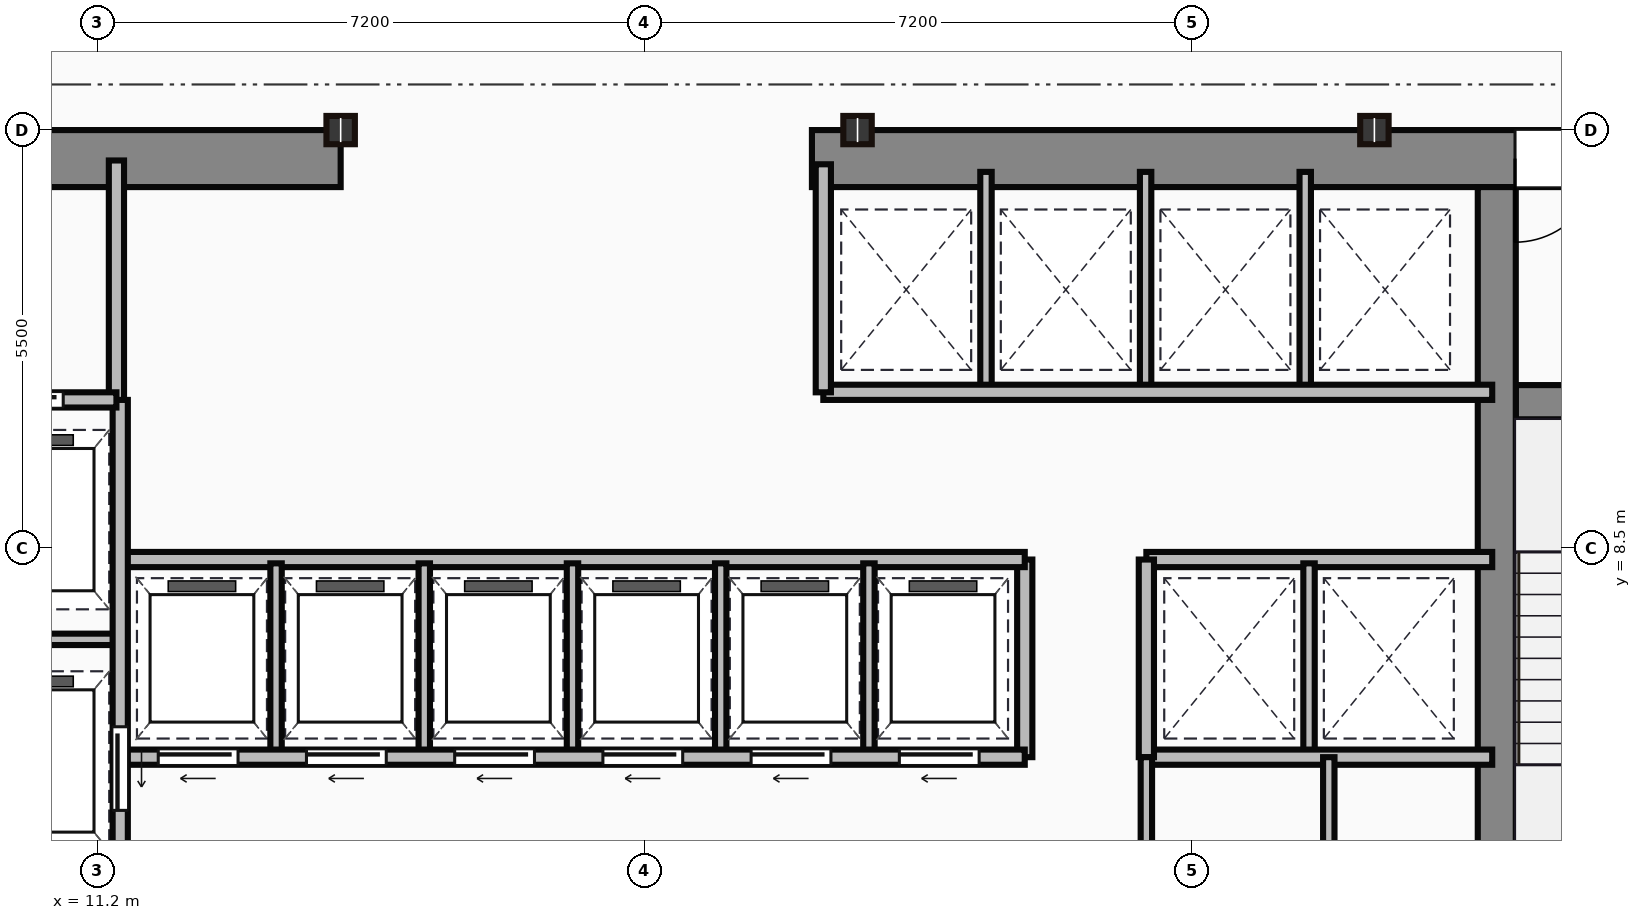
"""IFC4 building model, lengths in metres.
Left out: names, types, materials, properties, quantities, classifications, styles, units other than length and angle.
Written with IfcOpenShell. Run it as: python <this file> out.ifc"""

import sys

from ifc_helpers import new_model, si_unit, direction, frame, frame_2d, origin, origin_2d, place, context, subcontext, project, spatial, rectangle, i_section, extrude, source, transform, mapped, element, fill, save


model = new_model("IFC4")
c1 = context("Model", 3, precision=1e-05, world=origin(), true_north=direction((0.0, 1.0)))
c2 = subcontext(c1, "Body", "Model", "MODEL_VIEW")
j1 = project(units=[si_unit("LENGTHUNIT", "METRE"), si_unit("PLANEANGLEUNIT", "RADIAN")], contexts=[c1])
p1 = place(None, origin())
s1 = spatial("IfcSite", under=j1, at=p1, CompositionType="ELEMENT")
p2 = place(p1, origin())
s2 = spatial("IfcBuilding", under=s1, at=p2, CompositionType="ELEMENT")
p3 = place(p2, frame((0.0, 0.0, 177.1)))
s3 = spatial("IfcBuildingStorey", under=s2, at=p3, CompositionType="ELEMENT", Elevation=177.1)
m1 = source(origin(), c2, "Body", "SweptSolid", [
    extrude(rectangle(XDim=9.1, YDim=0.75, at=frame_2d((4.55, 0.0))), origin(), (0.0, 0.0, 1.0), 3.65),
])
p4 = place(p3, frame((5.3, 13.625, 0.0), z_axis=(0.0, 0.0, 1.0), x_axis=(1.0, 0.0, 0.0)))
e1 = element("IfcWall", 1, at=p4, inside=s3, PredefinedType="SHEAR", context=c2, shape_type="MappedRepresentation", body=[
    mapped(m1, transform((0.0, 0.0, 0.0))),
])
p5 = place(p4, frame((4.1, 0.0, 0.0)))
e2 = element("IfcOpeningElement", 2, at=p5, cuts=e1, PredefinedType="OPENING", context=c2, shape_type="SweptSolid", body=[
    extrude(rectangle(XDim=1.1, YDim=2.15, at=frame_2d((0.55, 1.075))), frame((0.0, 0.385, 0.0), z_axis=(0.0, -1.0, 0.0), x_axis=(1.0, 0.0, 0.0)), (0.0, 0.0, 1.0), 0.77),
])
m2 = source(origin(), c2, "Body", "SweptSolid", [
    extrude(rectangle(XDim=12.6, YDim=0.75, at=frame_2d((6.3, 0.0))), origin(), (0.0, 0.0, 1.0), 3.65),
])
p6 = place(p3, frame((20.6, 13.625, 0.0), z_axis=(0.0, 0.0, 1.0), x_axis=(1.0, 0.0, 0.0)))
e3 = element("IfcWall", 3, at=p6, inside=s3, PredefinedType="SHEAR", context=c2, shape_type="MappedRepresentation", body=[
    mapped(m2, transform((0.0, 0.0, 0.0))),
])
p7 = place(p6, frame((9.25, 0.0, 0.0)))
e4 = element("IfcOpeningElement", 4, at=p7, cuts=e3, PredefinedType="OPENING", context=c2, shape_type="SweptSolid", body=[
    extrude(rectangle(XDim=1.1, YDim=2.15, at=frame_2d((0.55, 1.075))), frame((0.0, 0.385, 0.0), z_axis=(0.0, -1.0, 0.0), x_axis=(1.0, 0.0, 0.0)), (0.0, 0.0, 1.0), 0.77),
])
m3 = source(origin(), c2, "Body", "SweptSolid", [
    extrude(rectangle(XDim=12.35, YDim=0.5, at=frame_2d((6.175, 0.0))), origin(), (0.0, 0.0, 1.0), 3.65),
])
p8 = place(p3, frame((29.61, 0.9, 0.0), z_axis=(0.0, 0.0, 1.0), x_axis=(0.0, 1.0, 0.0)))
e5 = element("IfcWall", 5, at=p8, inside=s3, PredefinedType="SHEAR", context=c2, shape_type="MappedRepresentation", body=[
    mapped(m3, transform((0.0, 0.0, 0.0))),
])
m4 = source(origin(), c2, "Body", "SweptSolid", [
    extrude(rectangle(XDim=3.39, YDim=0.45, at=frame_2d((1.695, 0.0))), origin(), (0.0, 0.0, 1.0), 3.65),
])
p9 = place(p3, frame((29.86, 10.42, 0.0), z_axis=(0.0, 0.0, 1.0), x_axis=(1.0, 0.0, 0.0)))
e6 = element("IfcWall", 6, at=p9, inside=s3, PredefinedType="SHEAR", context=c2, shape_type="MappedRepresentation", body=[
    mapped(m4, transform((0.0, 0.0, 0.0))),
])
p10 = place(p9, frame((1.1, 0.0, 0.0)))
e7 = element("IfcOpeningElement", 7, at=p10, cuts=e6, PredefinedType="OPENING", context=c2, shape_type="SweptSolid", body=[
    extrude(rectangle(XDim=1.1, YDim=2.15, at=frame_2d((0.55, 1.075))), frame((0.0, 0.235, 0.0), z_axis=(0.0, -1.0, 0.0), x_axis=(1.0, 0.0, 0.0)), (0.0, 0.0, 1.0), 0.47),
])
m5 = source(origin(), c2, "Body", "SweptSolid", [
    extrude(i_section(OverallWidth=0.374, OverallDepth=0.372, WebThickness=0.016, FlangeThickness=0.026, at=origin_2d()), origin(), (0.0, 0.0, 1.0), 3.65),
])
for number, where, z_axis, x_axis in (
    (8, (14.4, 14.0, 0.0), (0.0, 0.0, 1.0), (1.0, 0.0, 0.0)),
    (9, (21.2, 14.0, 0.0), (0.0, 0.0, 1.0), (1.0, 0.0, 0.0)),
    (10, (28.0, 14.0, 0.0), (0.0, 0.0, 1.0), (1.0, 0.0, 0.0)),
):
    element("IfcColumn", number, at=place(p3, frame(where, z_axis=z_axis, x_axis=x_axis)), inside=s3, PredefinedType="COLUMN", context=c2, shape_type="MappedRepresentation", body=[
        mapped(m5, transform((0.0, 0.0, 0.0))),
    ])
m6 = source(origin(), c2, "Body", "SweptSolid", [
    extrude(rectangle(XDim=3.18, YDim=0.2, at=frame_2d((1.59, 0.0))), origin(), (0.0, 0.0, 1.0), 3.4),
])
p11 = place(p3, frame((11.45, 10.42, 0.0), z_axis=(0.0, 0.0, 1.0), x_axis=(0.0, 1.0, 0.0)))
e11 = element("IfcWall", 11, at=p11, inside=s3, PredefinedType="PARTITIONING", context=c2, shape_type="MappedRepresentation", body=[
    mapped(m6, transform((0.0, 0.0, 0.0))),
])
m7 = source(origin(), c2, "Body", "SweptSolid", [
    extrude(rectangle(XDim=2.35, YDim=0.2, at=frame_2d((1.175, 0.0))), origin(), (0.0, 0.0, 1.0), 3.4),
])
p12 = place(p3, frame((9.1, 10.45, 0.0), z_axis=(0.0, 0.0, 1.0), x_axis=(1.0, 0.0, 0.0)))
e12 = element("IfcWall", 12, at=p12, inside=s3, PredefinedType="PARTITIONING", context=c2, shape_type="MappedRepresentation", body=[
    mapped(m7, transform((0.0, 0.0, 0.0))),
])
p13 = place(p12, frame((0.55, 0.0, 0.0)))
e13 = element("IfcOpeningElement", 13, at=p13, cuts=e12, PredefinedType="OPENING", context=c2, shape_type="SweptSolid", body=[
    extrude(rectangle(XDim=1.1, YDim=2.15, at=frame_2d((0.55, 1.075))), frame((0.0, 0.11, 0.0), z_axis=(0.0, -1.0, 0.0), x_axis=(1.0, 0.0, 0.0)), (0.0, 0.0, 1.0), 0.22),
])
m8 = source(origin(), c2, "Body", "SweptSolid", [
    extrude(rectangle(XDim=9.6, YDim=0.2, at=frame_2d((4.8, 0.0))), origin(), (0.0, 0.0, 1.0), 3.4),
])
p14 = place(p3, frame((11.5, 0.85, 0.0), z_axis=(0.0, 0.0, 1.0), x_axis=(0.0, 1.0, 0.0)))
e14 = element("IfcWall", 14, at=p14, inside=s3, PredefinedType="PARTITIONING", context=c2, shape_type="MappedRepresentation", body=[
    mapped(m8, transform((0.0, 0.0, 0.0))),
])
p15 = place(p14, frame((4.2, 0.0, 0.0)))
e15 = element("IfcOpeningElement", 15, at=p15, cuts=e14, PredefinedType="OPENING", context=c2, shape_type="SweptSolid", body=[
    extrude(rectangle(XDim=1.1, YDim=2.15, at=frame_2d((0.55, 1.075))), frame((0.0, 0.11, 0.0), z_axis=(0.0, -1.0, 0.0), x_axis=(1.0, 0.0, 0.0)), (0.0, 0.0, 1.0), 0.22),
])
p16 = place(p14, frame((0.9, 0.0, 0.0)))
e16 = element("IfcOpeningElement", 16, at=p16, cuts=e14, PredefinedType="OPENING", context=c2, shape_type="SweptSolid", body=[
    extrude(rectangle(XDim=1.2, YDim=2.15, at=frame_2d((0.6, 1.075))), frame((0.0, 0.11, 0.0), z_axis=(0.0, -1.0, 0.0), x_axis=(1.0, 0.0, 0.0)), (0.0, 0.0, 1.0), 0.22),
])
m9 = source(origin(), c2, "Body", "SweptSolid", [
    extrude(rectangle(XDim=2.4, YDim=0.15, at=frame_2d((1.2, 0.0))), origin(), (0.0, 0.0, 1.0), 3.4),
])
p17 = place(p3, frame((9.1, 7.3, 0.0), z_axis=(0.0, 0.0, 1.0), x_axis=(1.0, 0.0, 0.0)))
e17 = element("IfcWall", 17, at=p17, inside=s3, PredefinedType="PARTITIONING", context=c2, shape_type="MappedRepresentation", body=[
    mapped(m9, transform((0.0, 0.0, 0.0))),
])
m10 = source(origin(), c2, "Body", "SweptSolid", [
    extrude(rectangle(XDim=11.85, YDim=0.2, at=frame_2d((5.925, 0.0))), origin(), (0.0, 0.0, 1.0), 3.4),
])
p18 = place(p3, frame((11.55, 5.75, 0.0), z_axis=(0.0, 0.0, 1.0), x_axis=(1.0, 0.0, 0.0)))
e18 = element("IfcWall", 18, at=p18, inside=s3, PredefinedType="PARTITIONING", context=c2, shape_type="MappedRepresentation", body=[
    mapped(m10, transform((0.0, 0.0, 0.0))),
])
p19 = place(p18, frame((0.45, 0.0, 0.0)))
e19 = element("IfcOpeningElement", 19, at=p19, cuts=e18, PredefinedType="OPENING", context=c2, shape_type="SweptSolid", body=[
    extrude(rectangle(XDim=1.05, YDim=2.15, at=frame_2d((0.525, 1.075))), frame((0.0, 0.11, 0.0), z_axis=(0.0, -1.0, 0.0), x_axis=(1.0, 0.0, 0.0)), (0.0, 0.0, 1.0), 0.22),
])
p20 = place(p18, frame((2.4, 0.0, 0.0)))
e20 = element("IfcOpeningElement", 20, at=p20, cuts=e18, PredefinedType="OPENING", context=c2, shape_type="SweptSolid", body=[
    extrude(rectangle(XDim=1.05, YDim=2.15, at=frame_2d((0.525, 1.075))), frame((0.0, 0.11, 0.0), z_axis=(0.0, -1.0, 0.0), x_axis=(1.0, 0.0, 0.0)), (0.0, 0.0, 1.0), 0.22),
])
p21 = place(p18, frame((4.35, 0.0, 0.0)))
e21 = element("IfcOpeningElement", 21, at=p21, cuts=e18, PredefinedType="OPENING", context=c2, shape_type="SweptSolid", body=[
    extrude(rectangle(XDim=1.05, YDim=2.15, at=frame_2d((0.525, 1.075))), frame((0.0, 0.11, 0.0), z_axis=(0.0, -1.0, 0.0), x_axis=(1.0, 0.0, 0.0)), (0.0, 0.0, 1.0), 0.22),
])
p22 = place(p18, frame((6.3, 0.0, 0.0)))
e22 = element("IfcOpeningElement", 22, at=p22, cuts=e18, PredefinedType="OPENING", context=c2, shape_type="SweptSolid", body=[
    extrude(rectangle(XDim=1.05, YDim=2.15, at=frame_2d((0.525, 1.075))), frame((0.0, 0.11, 0.0), z_axis=(0.0, -1.0, 0.0), x_axis=(1.0, 0.0, 0.0)), (0.0, 0.0, 1.0), 0.22),
])
p23 = place(p18, frame((8.25, 0.0, 0.0)))
e23 = element("IfcOpeningElement", 23, at=p23, cuts=e18, PredefinedType="OPENING", context=c2, shape_type="SweptSolid", body=[
    extrude(rectangle(XDim=1.05, YDim=2.15, at=frame_2d((0.525, 1.075))), frame((0.0, 0.11, 0.0), z_axis=(0.0, -1.0, 0.0), x_axis=(1.0, 0.0, 0.0)), (0.0, 0.0, 1.0), 0.22),
])
p24 = place(p18, frame((10.2, 0.0, 0.0)))
e24 = element("IfcOpeningElement", 24, at=p24, cuts=e18, PredefinedType="OPENING", context=c2, shape_type="SweptSolid", body=[
    extrude(rectangle(XDim=1.05, YDim=2.15, at=frame_2d((0.525, 1.075))), frame((0.0, 0.11, 0.0), z_axis=(0.0, -1.0, 0.0), x_axis=(1.0, 0.0, 0.0)), (0.0, 0.0, 1.0), 0.22),
])
p25 = place(p3, frame((11.55, 8.35, 0.0), z_axis=(0.0, 0.0, 1.0), x_axis=(1.0, 0.0, 0.0)))
e25 = element("IfcWall", 25, at=p25, inside=s3, PredefinedType="PARTITIONING", context=c2, shape_type="MappedRepresentation", body=[
    mapped(m10, transform((0.0, 0.0, 0.0))),
])
m11 = source(origin(), c2, "Body", "SweptSolid", [
    extrude(rectangle(XDim=2.6, YDim=0.2, at=frame_2d((1.3, 0.0))), origin(), (0.0, 0.0, 1.0), 3.4),
])
p26 = place(p3, frame((23.4, 5.75, 0.0), z_axis=(0.0, 0.0, 1.0), x_axis=(0.0, 1.0, 0.0)))
e26 = element("IfcWall", 26, at=p26, inside=s3, PredefinedType="PARTITIONING", context=c2, shape_type="MappedRepresentation", body=[
    mapped(m11, transform((0.0, 0.0, 0.0))),
])
m12 = source(origin(), c2, "Body", "SweptSolid", [
    extrude(rectangle(XDim=2.5, YDim=0.15, at=frame_2d((1.25, 0.0))), origin(), (0.0, 0.0, 1.0), 3.4),
])
for number, where, z_axis, x_axis in (
    (27, (13.55, 5.8, 0.0), (0.0, 0.0, 1.0), (0.0, 1.0, 0.0)),
    (28, (15.5, 5.8, 0.0), (0.0, 0.0, 1.0), (0.0, 1.0, 0.0)),
    (29, (17.45, 5.8, 0.0), (0.0, 0.0, 1.0), (0.0, 1.0, 0.0)),
    (30, (19.4, 5.8, 0.0), (0.0, 0.0, 1.0), (0.0, 1.0, 0.0)),
    (31, (21.35, 5.8, 0.0), (0.0, 0.0, 1.0), (0.0, 1.0, 0.0)),
):
    element("IfcWall", number, at=place(p3, frame(where, z_axis=z_axis, x_axis=x_axis)), inside=s3, PredefinedType="PARTITIONING", context=c2, shape_type="MappedRepresentation", body=[
        mapped(m12, transform((0.0, 0.0, 0.0))),
    ])
m13 = source(origin(), c2, "Body", "SweptSolid", [
    extrude(rectangle(XDim=8.8, YDim=0.2, at=frame_2d((4.4, 0.0))), origin(), (0.0, 0.0, 1.0), 3.4),
])
p27 = place(p3, frame((20.75, 10.55, 0.0), z_axis=(0.0, 0.0, 1.0), x_axis=(1.0, 0.0, 0.0)))
e32 = element("IfcWall", 32, at=p27, inside=s3, PredefinedType="PARTITIONING", context=c2, shape_type="MappedRepresentation", body=[
    mapped(m13, transform((0.0, 0.0, 0.0))),
])
m14 = source(origin(), c2, "Body", "SweptSolid", [
    extrude(rectangle(XDim=3.0, YDim=0.2, at=frame_2d((1.5, 0.0))), origin(), (0.0, 0.0, 1.0), 3.4),
])
p28 = place(p3, frame((20.75, 10.55, 0.0), z_axis=(0.0, 0.0, 1.0), x_axis=(0.0, 1.0, 0.0)))
e33 = element("IfcWall", 33, at=p28, inside=s3, PredefinedType="PARTITIONING", context=c2, shape_type="MappedRepresentation", body=[
    mapped(m14, transform((0.0, 0.0, 0.0))),
])
m15 = source(origin(), c2, "Body", "SweptSolid", [
    extrude(rectangle(XDim=2.85, YDim=0.15, at=frame_2d((1.425, 0.0))), origin(), (0.0, 0.0, 1.0), 3.4),
])
for number, where, z_axis, x_axis in (
    (34, (22.89, 10.6, 0.0), (0.0, 0.0, 1.0), (0.0, 1.0, 0.0)),
    (35, (24.99, 10.6, 0.0), (0.0, 0.0, 1.0), (0.0, 1.0, 0.0)),
    (36, (27.09, 10.6, 0.0), (0.0, 0.0, 1.0), (0.0, 1.0, 0.0)),
):
    element("IfcWall", number, at=place(p3, frame(where, z_axis=z_axis, x_axis=x_axis)), inside=s3, PredefinedType="PARTITIONING", context=c2, shape_type="MappedRepresentation", body=[
        mapped(m15, transform((0.0, 0.0, 0.0))),
    ])
m16 = source(origin(), c2, "Body", "SweptSolid", [
    extrude(rectangle(XDim=4.55, YDim=0.2, at=frame_2d((2.275, 0.0))), origin(), (0.0, 0.0, 1.0), 3.4),
])
for number, where, z_axis, x_axis in (
    (37, (25.0, 8.35, 0.0), (0.0, 0.0, 1.0), (1.0, 0.0, 0.0)),
    (38, (25.0, 5.75, 0.0), (0.0, 0.0, 1.0), (1.0, 0.0, 0.0)),
):
    element("IfcWall", number, at=place(p3, frame(where, z_axis=z_axis, x_axis=x_axis)), inside=s3, PredefinedType="PARTITIONING", context=c2, shape_type="MappedRepresentation", body=[
        mapped(m16, transform((0.0, 0.0, 0.0))),
    ])
p29 = place(p3, frame((25.0, 5.75, 0.0), z_axis=(0.0, 0.0, 1.0), x_axis=(0.0, 1.0, 0.0)))
e39 = element("IfcWall", 39, at=p29, inside=s3, PredefinedType="PARTITIONING", context=c2, shape_type="MappedRepresentation", body=[
    mapped(m11, transform((0.0, 0.0, 0.0))),
])
p30 = place(p3, frame((27.14, 5.8, 0.0), z_axis=(0.0, 0.0, 1.0), x_axis=(0.0, 1.0, 0.0)))
e40 = element("IfcWall", 40, at=p30, inside=s3, PredefinedType="PARTITIONING", context=c2, shape_type="MappedRepresentation", body=[
    mapped(m12, transform((0.0, 0.0, 0.0))),
])
m17 = source(origin(), c2, "Body", "SweptSolid", [
    extrude(rectangle(XDim=4.9, YDim=0.15, at=frame_2d((2.45, 0.0))), origin(), (0.0, 0.0, 1.0), 3.4),
])
p31 = place(p3, frame((25.0, 0.85, 0.0), z_axis=(0.0, 0.0, 1.0), x_axis=(0.0, 1.0, 0.0)))
e41 = element("IfcWall", 41, at=p31, inside=s3, PredefinedType="PARTITIONING", context=c2, shape_type="MappedRepresentation", body=[
    mapped(m17, transform((0.0, 0.0, 0.0))),
])
p32 = place(p31, frame((2.5, 0.0, 0.0)))
e42 = element("IfcOpeningElement", 42, at=p32, cuts=e41, PredefinedType="OPENING", context=c2, shape_type="SweptSolid", body=[
    extrude(rectangle(XDim=0.95, YDim=2.15, at=frame_2d((0.475, 1.075))), frame((0.0, 0.085, 0.0), z_axis=(0.0, -1.0, 0.0), x_axis=(1.0, 0.0, 0.0)), (0.0, 0.0, 1.0), 0.17),
])
m18 = source(origin(), c2, "Body", "SweptSolid", [
    extrude(rectangle(XDim=3.4, YDim=0.15, at=frame_2d((1.7, 0.0))), origin(), (0.0, 0.0, 1.0), 3.4),
])
p33 = place(p3, frame((27.4, 2.35, 0.0), z_axis=(0.0, 0.0, 1.0), x_axis=(0.0, 1.0, 0.0)))
e43 = element("IfcWall", 43, at=p33, inside=s3, PredefinedType="PARTITIONING", context=c2, shape_type="MappedRepresentation", body=[
    mapped(m18, transform((0.0, 0.0, 0.0))),
])
p34 = place(p33, frame((1.1, 0.0, 0.0)))
e44 = element("IfcOpeningElement", 44, at=p34, cuts=e43, PredefinedType="OPENING", context=c2, shape_type="SweptSolid", body=[
    extrude(rectangle(XDim=0.85, YDim=2.1, at=frame_2d((0.425, 1.05))), frame((0.0, 0.085, 0.0), z_axis=(0.0, -1.0, 0.0), x_axis=(1.0, 0.0, 0.0)), (0.0, 0.0, 1.0), 0.17),
])
m19 = source(origin(), c2, "Body", "SweptSolid", [
    extrude(rectangle(XDim=1.1, YDim=2.15, at=frame_2d((0.55, 1.075))), frame((0.0, 0.025, 0.0), z_axis=(0.0, -1.0, 0.0), x_axis=(1.0, 0.0, 0.0)), (0.0, 0.0, 1.0), 0.05),
])
p35 = place(p7, origin())
e45 = element("IfcDoor", 45, at=p35, inside=s3, OperationType="SINGLE_SWING_LEFT", PredefinedType="DOOR", context=c2, shape_type="MappedRepresentation", body=[
    mapped(m19, transform((0.0, 0.0, 0.0))),
])
fill(e4, e45)
p36 = place(p13, origin())
e46 = element("IfcDoor", 46, at=p36, inside=s3, OperationType="SLIDING_TO_LEFT", PredefinedType="DOOR", context=c2, shape_type="MappedRepresentation", body=[
    mapped(m19, transform((0.0, 0.0, 0.0))),
])
fill(e13, e46)
p37 = place(p15, frame((1.1, 0.0, 0.0), z_axis=(0.0, 0.0, 1.0), x_axis=(-1.0, 0.0, 0.0)))
e47 = element("IfcDoor", 47, at=p37, inside=s3, OperationType="SLIDING_TO_LEFT", PredefinedType="DOOR", context=c2, shape_type="MappedRepresentation", body=[
    mapped(m19, transform((0.0, 0.0, 0.0))),
])
fill(e15, e47)
m20 = source(origin(), c2, "Body", "SweptSolid", [
    extrude(rectangle(XDim=1.05, YDim=2.15, at=frame_2d((0.525, 1.075))), frame((0.0, 0.025, 0.0), z_axis=(0.0, -1.0, 0.0), x_axis=(1.0, 0.0, 0.0)), (0.0, 0.0, 1.0), 0.05),
])
p38 = place(p19, frame((1.05, 0.0, 0.0), z_axis=(0.0, 0.0, 1.0), x_axis=(-1.0, 0.0, 0.0)))
e48 = element("IfcDoor", 48, at=p38, inside=s3, OperationType="SLIDING_TO_LEFT", PredefinedType="DOOR", context=c2, shape_type="MappedRepresentation", body=[
    mapped(m20, transform((0.0, 0.0, 0.0))),
])
fill(e19, e48)
p39 = place(p20, frame((1.05, 0.0, 0.0), z_axis=(0.0, 0.0, 1.0), x_axis=(-1.0, 0.0, 0.0)))
e49 = element("IfcDoor", 49, at=p39, inside=s3, OperationType="SLIDING_TO_LEFT", PredefinedType="DOOR", context=c2, shape_type="MappedRepresentation", body=[
    mapped(m20, transform((0.0, 0.0, 0.0))),
])
fill(e20, e49)
p40 = place(p21, frame((1.05, 0.0, 0.0), z_axis=(0.0, 0.0, 1.0), x_axis=(-1.0, 0.0, 0.0)))
e50 = element("IfcDoor", 50, at=p40, inside=s3, OperationType="SLIDING_TO_LEFT", PredefinedType="DOOR", context=c2, shape_type="MappedRepresentation", body=[
    mapped(m20, transform((0.0, 0.0, 0.0))),
])
fill(e21, e50)
p41 = place(p22, frame((1.05, 0.0, 0.0), z_axis=(0.0, 0.0, 1.0), x_axis=(-1.0, 0.0, 0.0)))
e51 = element("IfcDoor", 51, at=p41, inside=s3, OperationType="SLIDING_TO_LEFT", PredefinedType="DOOR", context=c2, shape_type="MappedRepresentation", body=[
    mapped(m20, transform((0.0, 0.0, 0.0))),
])
fill(e22, e51)
p42 = place(p23, frame((1.05, 0.0, 0.0), z_axis=(0.0, 0.0, 1.0), x_axis=(-1.0, 0.0, 0.0)))
e52 = element("IfcDoor", 52, at=p42, inside=s3, OperationType="SLIDING_TO_LEFT", PredefinedType="DOOR", context=c2, shape_type="MappedRepresentation", body=[
    mapped(m20, transform((0.0, 0.0, 0.0))),
])
fill(e23, e52)
p43 = place(p24, frame((1.05, 0.0, 0.0), z_axis=(0.0, 0.0, 1.0), x_axis=(-1.0, 0.0, 0.0)))
e53 = element("IfcDoor", 53, at=p43, inside=s3, OperationType="SLIDING_TO_LEFT", PredefinedType="DOOR", context=c2, shape_type="MappedRepresentation", body=[
    mapped(m20, transform((0.0, 0.0, 0.0))),
])
fill(e24, e53)
save(model, sys.argv[1])
